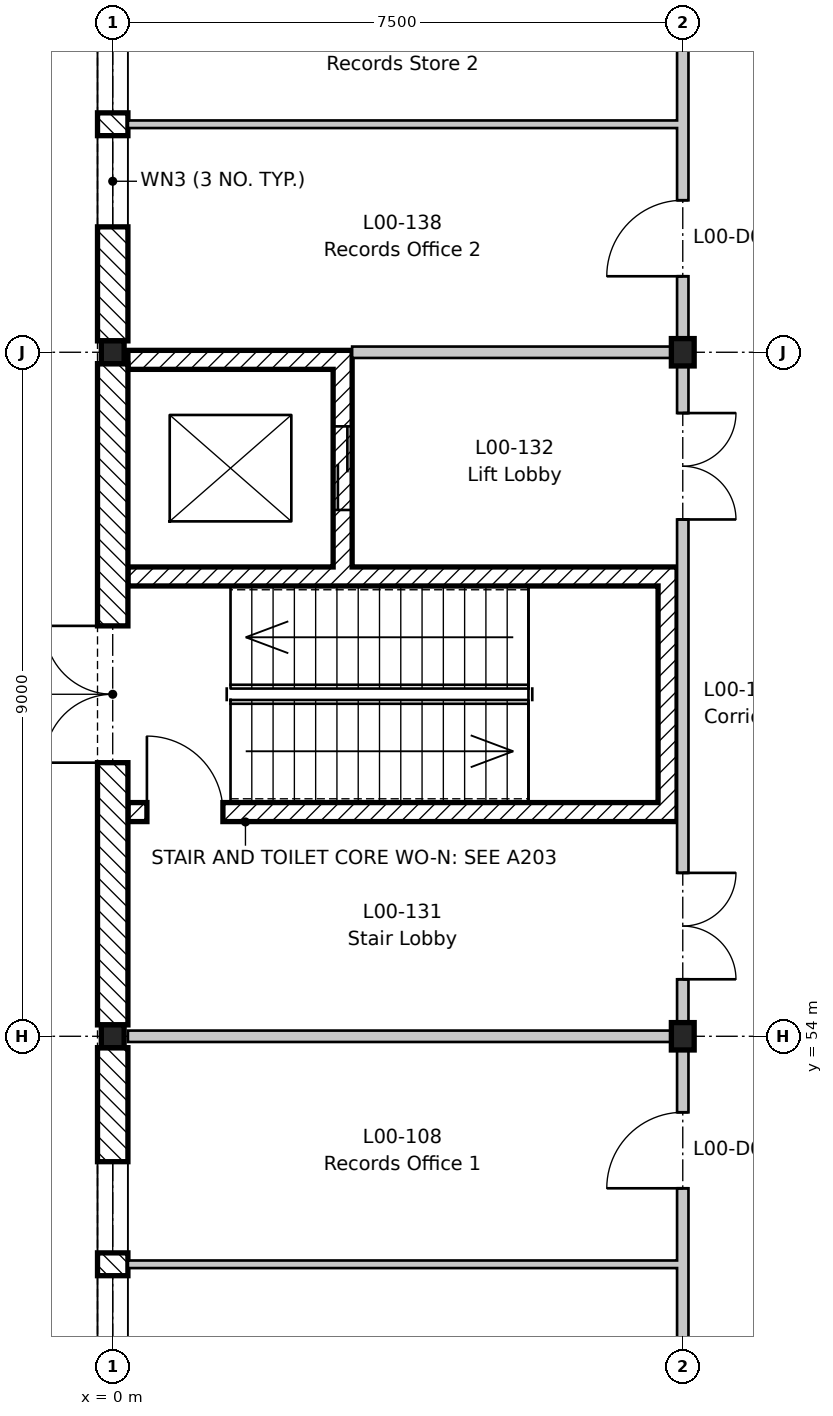
"""IFC4 building model, lengths in metres.
Left out: names, types, materials, properties, quantities, classifications, styles, units other than length and angle.
Written with IfcOpenShell. Run it as: python <this file> out.ifc"""

import sys

from ifc_helpers import new_model, si_unit, direction, frame, frame_2d, origin, origin_2d, place, context, subcontext, project, spatial, rectangle, i_section, extrude, element, fill, save


model = new_model("IFC4")
c1 = context("Model", 3, precision=1e-05, world=origin(), true_north=direction((0.0, 1.0)))
c2 = subcontext(c1, "Body", "Model", "MODEL_VIEW")
j1 = project(units=[si_unit("LENGTHUNIT", "METRE"), si_unit("PLANEANGLEUNIT", "RADIAN")], contexts=[c1])
p1 = place(None, origin())
s1 = spatial("IfcSite", under=j1, at=p1, CompositionType="ELEMENT")
p2 = place(p1, origin())
s2 = spatial("IfcBuilding", under=s1, at=p2, CompositionType="ELEMENT")
p3 = place(p2, origin())
s3 = spatial("IfcBuildingStorey", under=s2, at=p3, CompositionType="ELEMENT", Elevation=0.0)
for number, where, z_axis, x_axis in (
    (1, (0.0, 54.0, -0.6), (0.0, 0.0, 1.0), (1.0, 0.0, 0.0)),
    (2, (0.0, 63.0, -0.6), (0.0, 0.0, 1.0), (1.0, 0.0, 0.0)),
):
    element("IfcColumn", number, at=place(p3, frame(where, z_axis=z_axis, x_axis=x_axis)), inside=s3, PredefinedType="COLUMN", context=c2, shape_type="SweptSolid", body=[
        extrude(i_section(OverallWidth=0.3, OverallDepth=0.3, WebThickness=0.011, FlangeThickness=0.019, FilletRadius=0.027, at=origin_2d()), origin(), (0.0, 0.0, 1.0), 5.8),
    ])
for number, where, z_axis, x_axis in (
    (3, (7.5, 54.0, -0.6), (0.0, 0.0, 1.0), (1.0, 0.0, 0.0)),
    (4, (7.5, 63.0, -0.6), (0.0, 0.0, 1.0), (1.0, 0.0, 0.0)),
):
    element("IfcColumn", number, at=place(p3, frame(where, z_axis=z_axis, x_axis=x_axis)), inside=s3, PredefinedType="COLUMN", context=c2, shape_type="SweptSolid", body=[
        extrude(i_section(OverallWidth=0.3, OverallDepth=0.36, WebThickness=0.012, FlangeThickness=0.022, FilletRadius=0.027, at=origin_2d()), origin(), (0.0, 0.0, 1.0), 5.8),
    ])
p4 = place(p3, frame((0.2, 56.95, 0.0), z_axis=(0.0, 0.0, 1.0), x_axis=(1.0, 0.0, 0.0)))
e5 = element("IfcWall", 5, at=p4, inside=s3, PredefinedType="SHEAR", context=c2, shape_type="SweptSolid", body=[
    extrude(rectangle(XDim=7.225, YDim=0.25, at=frame_2d((3.613, 0.0))), origin(), (0.0, 0.0, 1.0), 5.2),
])
p5 = place(p4, frame((0.25, 0.0, 0.0)))
e6 = element("IfcOpeningElement", 6, at=p5, cuts=e5, PredefinedType="OPENING", context=c2, shape_type="SweptSolid", body=[
    extrude(rectangle(XDim=1.0, YDim=2.1, at=frame_2d((0.5, 1.05))), frame((0.0, 0.135, 0.0), z_axis=(0.0, -1.0, 0.0), x_axis=(1.0, 0.0, 0.0)), (0.0, 0.0, 1.0), 0.27),
])
p6 = place(p3, frame((0.2, 60.05, 0.0), z_axis=(0.0, 0.0, 1.0), x_axis=(1.0, 0.0, 0.0)))
e7 = element("IfcWall", 7, at=p6, inside=s3, PredefinedType="SHEAR", context=c2, shape_type="SweptSolid", body=[
    extrude(rectangle(XDim=7.225, YDim=0.25, at=frame_2d((3.613, 0.0))), origin(), (0.0, 0.0, 1.0), 5.2),
])
p7 = place(p3, frame((7.3, 57.075, 0.0), z_axis=(0.0, 0.0, 1.0), x_axis=(0.0, 1.0, 0.0)))
e8 = element("IfcWall", 8, at=p7, inside=s3, PredefinedType="SHEAR", context=c2, shape_type="SweptSolid", body=[
    extrude(rectangle(XDim=2.85, YDim=0.25, at=frame_2d((1.425, 0.0))), origin(), (0.0, 0.0, 1.0), 5.2),
])
p8 = place(p3, frame((3.025, 60.175, 0.0), z_axis=(0.0, 0.0, 1.0), x_axis=(0.0, 1.0, 0.0)))
e9 = element("IfcWall", 9, at=p8, inside=s3, PredefinedType="SHEAR", context=c2, shape_type="SweptSolid", body=[
    extrude(rectangle(XDim=2.6, YDim=0.25, at=frame_2d((1.3, 0.0))), origin(), (0.0, 0.0, 1.0), 5.2),
])
p9 = place(p8, frame((0.75, 0.0, 0.0)))
e10 = element("IfcOpeningElement", 10, at=p9, cuts=e9, PredefinedType="OPENING", context=c2, shape_type="SweptSolid", body=[
    extrude(rectangle(XDim=1.1, YDim=2.1, at=frame_2d((0.55, 1.05))), frame((0.0, 0.135, 0.0), z_axis=(0.0, -1.0, 0.0), x_axis=(1.0, 0.0, 0.0)), (0.0, 0.0, 1.0), 0.27),
])
p10 = place(p3, frame((0.2, 62.9, 0.0), z_axis=(0.0, 0.0, 1.0), x_axis=(1.0, 0.0, 0.0)))
e11 = element("IfcWall", 11, at=p10, inside=s3, PredefinedType="SHEAR", context=c2, shape_type="SweptSolid", body=[
    extrude(rectangle(XDim=2.95, YDim=0.25, at=frame_2d((1.475, 0.0))), origin(), (0.0, 0.0, 1.0), 5.2),
])
p11 = place(p3, frame((0.2, 60.05, -1.5), z_axis=(0.0, 0.0, 1.0), x_axis=(1.0, 0.0, 0.0)))
e12 = element("IfcWall", 12, at=p11, inside=s3, PredefinedType="SHEAR", context=c2, shape_type="SweptSolid", body=[
    extrude(rectangle(XDim=2.95, YDim=0.25, at=frame_2d((1.475, 0.0))), origin(), (0.0, 0.0, 1.0), 1.5),
])
p12 = place(p3, frame((3.025, 60.175, -1.5), z_axis=(0.0, 0.0, 1.0), x_axis=(0.0, 1.0, 0.0)))
e13 = element("IfcWall", 13, at=p12, inside=s3, PredefinedType="SHEAR", context=c2, shape_type="SweptSolid", body=[
    extrude(rectangle(XDim=2.6, YDim=0.25, at=frame_2d((1.3, 0.0))), origin(), (0.0, 0.0, 1.0), 1.5),
])
p13 = place(p3, frame((0.2, 62.9, -1.5), z_axis=(0.0, 0.0, 1.0), x_axis=(1.0, 0.0, 0.0)))
e14 = element("IfcWall", 14, at=p13, inside=s3, PredefinedType="SHEAR", context=c2, shape_type="SweptSolid", body=[
    extrude(rectangle(XDim=2.95, YDim=0.25, at=frame_2d((1.475, 0.0))), origin(), (0.0, 0.0, 1.0), 1.5),
])
p14 = place(p3, frame((0.0, 45.15, 0.0), z_axis=(0.0, 0.0, 1.0), x_axis=(0.0, 1.0, 0.0)))
e15 = element("IfcWall", 15, at=p14, inside=s3, PredefinedType="STANDARD", context=c2, shape_type="SweptSolid", body=[
    extrude(rectangle(XDim=8.7, YDim=0.4, at=frame_2d((4.35, 0.0))), origin(), (0.0, 0.0, 1.0), 4.8),
])
p15 = place(p14, frame((1.5, 0.0, 0.6)))
e16 = element("IfcOpeningElement", 16, at=p15, cuts=e15, PredefinedType="OPENING", context=c2, shape_type="SweptSolid", body=[
    extrude(rectangle(XDim=1.2, YDim=3.9, at=frame_2d((0.6, 1.95))), frame((0.0, 0.21, 0.0), z_axis=(0.0, -1.0, 0.0), x_axis=(1.0, 0.0, 0.0)), (0.0, 0.0, 1.0), 0.42),
])
p16 = place(p14, frame((3.0, 0.0, 0.6)))
e17 = element("IfcOpeningElement", 17, at=p16, cuts=e15, PredefinedType="OPENING", context=c2, shape_type="SweptSolid", body=[
    extrude(rectangle(XDim=1.2, YDim=3.9, at=frame_2d((0.6, 1.95))), frame((0.0, 0.21, 0.0), z_axis=(0.0, -1.0, 0.0), x_axis=(1.0, 0.0, 0.0)), (0.0, 0.0, 1.0), 0.42),
])
p17 = place(p14, frame((4.5, 0.0, 0.6)))
e18 = element("IfcOpeningElement", 18, at=p17, cuts=e15, PredefinedType="OPENING", context=c2, shape_type="SweptSolid", body=[
    extrude(rectangle(XDim=1.2, YDim=3.9, at=frame_2d((0.6, 1.95))), frame((0.0, 0.21, 0.0), z_axis=(0.0, -1.0, 0.0), x_axis=(1.0, 0.0, 0.0)), (0.0, 0.0, 1.0), 0.42),
])
p18 = place(p14, frame((6.0, 0.0, 0.6)))
e19 = element("IfcOpeningElement", 19, at=p18, cuts=e15, PredefinedType="OPENING", context=c2, shape_type="SweptSolid", body=[
    extrude(rectangle(XDim=1.2, YDim=3.9, at=frame_2d((0.6, 1.95))), frame((0.0, 0.21, 0.0), z_axis=(0.0, -1.0, 0.0), x_axis=(1.0, 0.0, 0.0)), (0.0, 0.0, 1.0), 0.42),
])
p19 = place(p3, frame((0.0, 54.15, 0.0), z_axis=(0.0, 0.0, 1.0), x_axis=(0.0, 1.0, 0.0)))
e20 = element("IfcWall", 20, at=p19, inside=s3, PredefinedType="STANDARD", context=c2, shape_type="SweptSolid", body=[
    extrude(rectangle(XDim=8.7, YDim=0.4, at=frame_2d((4.35, 0.0))), origin(), (0.0, 0.0, 1.0), 4.8),
])
p20 = place(p19, frame((3.45, 0.0, 0.0)))
e21 = element("IfcOpeningElement", 21, at=p20, cuts=e20, PredefinedType="OPENING", context=c2, shape_type="SweptSolid", body=[
    extrude(rectangle(XDim=1.8, YDim=2.1, at=frame_2d((0.9, 1.05))), frame((0.0, 0.21, 0.0), z_axis=(0.0, -1.0, 0.0), x_axis=(1.0, 0.0, 0.0)), (0.0, 0.0, 1.0), 0.42),
])
p21 = place(p3, frame((0.0, 63.15, 0.0), z_axis=(0.0, 0.0, 1.0), x_axis=(0.0, 1.0, 0.0)))
e22 = element("IfcWall", 22, at=p21, inside=s3, PredefinedType="STANDARD", context=c2, shape_type="SweptSolid", body=[
    extrude(rectangle(XDim=7.2, YDim=0.4, at=frame_2d((3.6, 0.0))), origin(), (0.0, 0.0, 1.0), 4.8),
])
p22 = place(p21, frame((1.5, 0.0, 0.6)))
e23 = element("IfcOpeningElement", 23, at=p22, cuts=e22, PredefinedType="OPENING", context=c2, shape_type="SweptSolid", body=[
    extrude(rectangle(XDim=1.2, YDim=3.9, at=frame_2d((0.6, 1.95))), frame((0.0, 0.21, 0.0), z_axis=(0.0, -1.0, 0.0), x_axis=(1.0, 0.0, 0.0)), (0.0, 0.0, 1.0), 0.42),
])
p23 = place(p21, frame((3.0, 0.0, 0.6)))
e24 = element("IfcOpeningElement", 24, at=p23, cuts=e22, PredefinedType="OPENING", context=c2, shape_type="SweptSolid", body=[
    extrude(rectangle(XDim=1.2, YDim=3.9, at=frame_2d((0.6, 1.95))), frame((0.0, 0.21, 0.0), z_axis=(0.0, -1.0, 0.0), x_axis=(1.0, 0.0, 0.0)), (0.0, 0.0, 1.0), 0.42),
])
p24 = place(p21, frame((4.5, 0.0, 0.6)))
e25 = element("IfcOpeningElement", 25, at=p24, cuts=e22, PredefinedType="OPENING", context=c2, shape_type="SweptSolid", body=[
    extrude(rectangle(XDim=1.2, YDim=3.9, at=frame_2d((0.6, 1.95))), frame((0.0, 0.21, 0.0), z_axis=(0.0, -1.0, 0.0), x_axis=(1.0, 0.0, 0.0)), (0.0, 0.0, 1.0), 0.42),
])
p25 = place(p3, frame((0.2, 51.0, 0.0), z_axis=(0.0, 0.0, 1.0), x_axis=(1.0, 0.0, 0.0)))
e26 = element("IfcWall", 26, at=p25, inside=s3, PredefinedType="PARTITIONING", context=c2, shape_type="SweptSolid", body=[
    extrude(rectangle(XDim=7.225, YDim=0.1, at=frame_2d((3.613, 0.0))), origin(), (0.0, 0.0, 1.0), 5.2),
])
p26 = place(p3, frame((0.2, 54.0, 0.0), z_axis=(0.0, 0.0, 1.0), x_axis=(1.0, 0.0, 0.0)))
e27 = element("IfcWall", 27, at=p26, inside=s3, PredefinedType="PARTITIONING", context=c2, shape_type="SweptSolid", body=[
    extrude(rectangle(XDim=7.225, YDim=0.15, at=frame_2d((3.613, 0.0))), origin(), (0.0, 0.0, 1.0), 4.85),
])
p27 = place(p3, frame((7.5, -8.8, 0.0), z_axis=(0.0, 0.0, 1.0), x_axis=(0.0, 1.0, 0.0)))
e28 = element("IfcWall", 28, at=p27, inside=s3, PredefinedType="PARTITIONING", context=c2, shape_type="SweptSolid", body=[
    extrude(rectangle(XDim=79.3, YDim=0.15, at=frame_2d((39.65, 0.0))), origin(), (0.0, 0.0, 1.0), 4.68),
])
p28 = place(p27, frame((18.8, 0.0, 0.0)))
e29 = element("IfcOpeningElement", 29, at=p28, cuts=e28, PredefinedType="OPENING", context=c2, shape_type="SweptSolid", body=[
    extrude(rectangle(XDim=1.0, YDim=2.1, at=frame_2d((0.5, 1.05))), frame((0.0, 0.085, 0.0), z_axis=(0.0, -1.0, 0.0), x_axis=(1.0, 0.0, 0.0)), (0.0, 0.0, 1.0), 0.17),
])
p29 = place(p27, frame((23.3, 0.0, 0.0)))
e30 = element("IfcOpeningElement", 30, at=p29, cuts=e28, PredefinedType="OPENING", context=c2, shape_type="SweptSolid", body=[
    extrude(rectangle(XDim=1.0, YDim=2.1, at=frame_2d((0.5, 1.05))), frame((0.0, 0.085, 0.0), z_axis=(0.0, -1.0, 0.0), x_axis=(1.0, 0.0, 0.0)), (0.0, 0.0, 1.0), 0.17),
])
p30 = place(p27, frame((27.8, 0.0, 0.0)))
e31 = element("IfcOpeningElement", 31, at=p30, cuts=e28, PredefinedType="OPENING", context=c2, shape_type="SweptSolid", body=[
    extrude(rectangle(XDim=1.0, YDim=2.1, at=frame_2d((0.5, 1.05))), frame((0.0, 0.085, 0.0), z_axis=(0.0, -1.0, 0.0), x_axis=(1.0, 0.0, 0.0)), (0.0, 0.0, 1.0), 0.17),
])
p31 = place(p27, frame((30.8, 0.0, 0.0)))
e32 = element("IfcOpeningElement", 32, at=p31, cuts=e28, PredefinedType="OPENING", context=c2, shape_type="SweptSolid", body=[
    extrude(rectangle(XDim=1.0, YDim=2.1, at=frame_2d((0.5, 1.05))), frame((0.0, 0.085, 0.0), z_axis=(0.0, -1.0, 0.0), x_axis=(1.0, 0.0, 0.0)), (0.0, 0.0, 1.0), 0.17),
])
p32 = place(p27, frame((33.8, 0.0, 0.0)))
e33 = element("IfcOpeningElement", 33, at=p32, cuts=e28, PredefinedType="OPENING", context=c2, shape_type="SweptSolid", body=[
    extrude(rectangle(XDim=1.0, YDim=2.1, at=frame_2d((0.5, 1.05))), frame((0.0, 0.085, 0.0), z_axis=(0.0, -1.0, 0.0), x_axis=(1.0, 0.0, 0.0)), (0.0, 0.0, 1.0), 0.17),
])
p33 = place(p27, frame((48.6, 0.0, 0.0)))
e34 = element("IfcOpeningElement", 34, at=p33, cuts=e28, PredefinedType="OPENING", context=c2, shape_type="SweptSolid", body=[
    extrude(rectangle(XDim=1.4, YDim=2.1, at=frame_2d((0.7, 1.05))), frame((0.0, 0.085, 0.0), z_axis=(0.0, -1.0, 0.0), x_axis=(1.0, 0.0, 0.0)), (0.0, 0.0, 1.0), 0.17),
])
p34 = place(p27, frame((56.3, 0.0, 0.0)))
e35 = element("IfcOpeningElement", 35, at=p34, cuts=e28, PredefinedType="OPENING", context=c2, shape_type="SweptSolid", body=[
    extrude(rectangle(XDim=1.0, YDim=2.1, at=frame_2d((0.5, 1.05))), frame((0.0, 0.085, 0.0), z_axis=(0.0, -1.0, 0.0), x_axis=(1.0, 0.0, 0.0)), (0.0, 0.0, 1.0), 0.17),
])
p35 = place(p27, frame((60.8, 0.0, 0.0)))
e36 = element("IfcOpeningElement", 36, at=p35, cuts=e28, PredefinedType="OPENING", context=c2, shape_type="SweptSolid", body=[
    extrude(rectangle(XDim=1.0, YDim=2.1, at=frame_2d((0.5, 1.05))), frame((0.0, 0.085, 0.0), z_axis=(0.0, -1.0, 0.0), x_axis=(1.0, 0.0, 0.0)), (0.0, 0.0, 1.0), 0.17),
])
p36 = place(p27, frame((12.6, 0.0, 0.0)))
e37 = element("IfcOpeningElement", 37, at=p36, cuts=e28, PredefinedType="OPENING", context=c2, shape_type="SweptSolid", body=[
    extrude(rectangle(XDim=1.4, YDim=2.1, at=frame_2d((0.7, 1.05))), frame((0.0, 0.085, 0.0), z_axis=(0.0, -1.0, 0.0), x_axis=(1.0, 0.0, 0.0)), (0.0, 0.0, 1.0), 0.17),
])
p37 = place(p27, frame((3.6, 0.0, 0.0)))
e38 = element("IfcOpeningElement", 38, at=p37, cuts=e28, PredefinedType="OPENING", context=c2, shape_type="SweptSolid", body=[
    extrude(rectangle(XDim=1.4, YDim=2.1, at=frame_2d((0.7, 1.05))), frame((0.0, 0.085, 0.0), z_axis=(0.0, -1.0, 0.0), x_axis=(1.0, 0.0, 0.0)), (0.0, 0.0, 1.0), 0.17),
])
p38 = place(p27, frame((63.55, 0.0, 0.0)))
e39 = element("IfcOpeningElement", 39, at=p38, cuts=e28, PredefinedType="OPENING", context=c2, shape_type="SweptSolid", body=[
    extrude(rectangle(XDim=1.4, YDim=2.1, at=frame_2d((0.7, 1.05))), frame((0.0, 0.085, 0.0), z_axis=(0.0, -1.0, 0.0), x_axis=(1.0, 0.0, 0.0)), (0.0, 0.0, 1.0), 0.17),
])
p39 = place(p27, frame((69.6, 0.0, 0.0)))
e40 = element("IfcOpeningElement", 40, at=p39, cuts=e28, PredefinedType="OPENING", context=c2, shape_type="SweptSolid", body=[
    extrude(rectangle(XDim=1.4, YDim=2.1, at=frame_2d((0.7, 1.05))), frame((0.0, 0.085, 0.0), z_axis=(0.0, -1.0, 0.0), x_axis=(1.0, 0.0, 0.0)), (0.0, 0.0, 1.0), 0.17),
])
p40 = place(p27, frame((42.85, 0.0, 0.0)))
e41 = element("IfcOpeningElement", 41, at=p40, cuts=e28, PredefinedType="OPENING", context=c2, shape_type="SweptSolid", body=[
    extrude(rectangle(XDim=1.0, YDim=2.1, at=frame_2d((0.5, 1.05))), frame((0.0, 0.085, 0.0), z_axis=(0.0, -1.0, 0.0), x_axis=(1.0, 0.0, 0.0)), (0.0, 0.0, 1.0), 0.17),
])
p41 = place(p27, frame((36.55, 0.0, 0.0)))
e42 = element("IfcOpeningElement", 42, at=p41, cuts=e28, PredefinedType="OPENING", context=c2, shape_type="SweptSolid", body=[
    extrude(rectangle(XDim=1.4, YDim=2.1, at=frame_2d((0.7, 1.05))), frame((0.0, 0.085, 0.0), z_axis=(0.0, -1.0, 0.0), x_axis=(1.0, 0.0, 0.0)), (0.0, 0.0, 1.0), 0.17),
])
p42 = place(p27, frame((72.8, 0.0, 0.0)))
e43 = element("IfcOpeningElement", 43, at=p42, cuts=e28, PredefinedType="OPENING", context=c2, shape_type="SweptSolid", body=[
    extrude(rectangle(XDim=1.0, YDim=2.1, at=frame_2d((0.5, 1.05))), frame((0.0, 0.085, 0.0), z_axis=(0.0, -1.0, 0.0), x_axis=(1.0, 0.0, 0.0)), (0.0, 0.0, 1.0), 0.17),
])
p43 = place(p3, frame((3.15, 63.0, 0.0), z_axis=(0.0, 0.0, 1.0), x_axis=(1.0, 0.0, 0.0)))
e44 = element("IfcWall", 44, at=p43, inside=s3, PredefinedType="PARTITIONING", context=c2, shape_type="SweptSolid", body=[
    extrude(rectangle(XDim=4.275, YDim=0.15, at=frame_2d((2.138, 0.0))), origin(), (0.0, 0.0, 1.0), 4.85),
])
p44 = place(p3, frame((0.2, 66.0, 0.0), z_axis=(0.0, 0.0, 1.0), x_axis=(1.0, 0.0, 0.0)))
e45 = element("IfcWall", 45, at=p44, inside=s3, PredefinedType="PARTITIONING", context=c2, shape_type="SweptSolid", body=[
    extrude(rectangle(XDim=7.225, YDim=0.1, at=frame_2d((3.613, 0.0))), origin(), (0.0, 0.0, 1.0), 5.2),
])
p45 = place(p17, origin())
e46 = element("IfcWindow", 46, at=p45, inside=s3, PartitioningType="SINGLE_PANEL", PredefinedType="WINDOW", context=c2, shape_type="SweptSolid", body=[
    extrude(rectangle(XDim=1.2, YDim=3.9, at=frame_2d((0.6, 1.95))), frame((0.0, 0.03, 0.0), z_axis=(0.0, -1.0, 0.0), x_axis=(1.0, 0.0, 0.0)), (0.0, 0.0, 1.0), 0.06),
])
fill(e18, e46)
p46 = place(p18, origin())
e47 = element("IfcWindow", 47, at=p46, inside=s3, PartitioningType="SINGLE_PANEL", PredefinedType="WINDOW", context=c2, shape_type="SweptSolid", body=[
    extrude(rectangle(XDim=1.2, YDim=3.9, at=frame_2d((0.6, 1.95))), frame((0.0, 0.03, 0.0), z_axis=(0.0, -1.0, 0.0), x_axis=(1.0, 0.0, 0.0)), (0.0, 0.0, 1.0), 0.06),
])
fill(e19, e47)
p47 = place(p20, origin())
e48 = element("IfcDoor", 48, at=p47, inside=s3, OperationType="DOUBLE_DOOR_SINGLE_SWING", PredefinedType="DOOR", context=c2, shape_type="SweptSolid", body=[
    extrude(rectangle(XDim=1.8, YDim=2.1, at=frame_2d((0.9, 1.05))), frame((0.0, 0.025, 0.0), z_axis=(0.0, -1.0, 0.0), x_axis=(1.0, 0.0, 0.0)), (0.0, 0.0, 1.0), 0.05),
])
fill(e21, e48)
p48 = place(p22, origin())
e49 = element("IfcWindow", 49, at=p48, inside=s3, PartitioningType="SINGLE_PANEL", PredefinedType="WINDOW", context=c2, shape_type="SweptSolid", body=[
    extrude(rectangle(XDim=1.2, YDim=3.9, at=frame_2d((0.6, 1.95))), frame((0.0, 0.03, 0.0), z_axis=(0.0, -1.0, 0.0), x_axis=(1.0, 0.0, 0.0)), (0.0, 0.0, 1.0), 0.06),
])
fill(e23, e49)
p49 = place(p23, origin())
e50 = element("IfcWindow", 50, at=p49, inside=s3, PartitioningType="SINGLE_PANEL", PredefinedType="WINDOW", context=c2, shape_type="SweptSolid", body=[
    extrude(rectangle(XDim=1.2, YDim=3.9, at=frame_2d((0.6, 1.95))), frame((0.0, 0.03, 0.0), z_axis=(0.0, -1.0, 0.0), x_axis=(1.0, 0.0, 0.0)), (0.0, 0.0, 1.0), 0.06),
])
fill(e24, e50)
p50 = place(p35, origin())
e51 = element("IfcDoor", 51, at=p50, inside=s3, OperationType="SINGLE_SWING_LEFT", PredefinedType="DOOR", context=c2, shape_type="SweptSolid", body=[
    extrude(rectangle(XDim=1.0, YDim=2.1, at=frame_2d((0.5, 1.05))), frame((0.0, 0.025, 0.0), z_axis=(0.0, -1.0, 0.0), x_axis=(1.0, 0.0, 0.0)), (0.0, 0.0, 1.0), 0.05),
])
fill(e36, e51)
p51 = place(p5, origin())
e52 = element("IfcDoor", 52, at=p51, inside=s3, OperationType="SINGLE_SWING_LEFT", PredefinedType="DOOR", context=c2, shape_type="SweptSolid", body=[
    extrude(rectangle(XDim=1.0, YDim=2.1, at=frame_2d((0.5, 1.05))), frame((0.0, 0.025, 0.0), z_axis=(0.0, -1.0, 0.0), x_axis=(1.0, 0.0, 0.0)), (0.0, 0.0, 1.0), 0.05),
])
fill(e6, e52)
p52 = place(p38, frame((1.4, 0.0, 0.0), z_axis=(0.0, 0.0, 1.0), x_axis=(-1.0, 0.0, 0.0)))
e53 = element("IfcDoor", 53, at=p52, inside=s3, OperationType="DOUBLE_DOOR_SINGLE_SWING", PredefinedType="DOOR", context=c2, shape_type="SweptSolid", body=[
    extrude(rectangle(XDim=1.4, YDim=2.1, at=frame_2d((0.7, 1.05))), frame((0.0, 0.025, 0.0), z_axis=(0.0, -1.0, 0.0), x_axis=(1.0, 0.0, 0.0)), (0.0, 0.0, 1.0), 0.05),
])
fill(e39, e53)
p53 = place(p39, frame((1.4, 0.0, 0.0), z_axis=(0.0, 0.0, 1.0), x_axis=(-1.0, 0.0, 0.0)))
e54 = element("IfcDoor", 54, at=p53, inside=s3, OperationType="DOUBLE_DOOR_SINGLE_SWING", PredefinedType="DOOR", context=c2, shape_type="SweptSolid", body=[
    extrude(rectangle(XDim=1.4, YDim=2.1, at=frame_2d((0.7, 1.05))), frame((0.0, 0.025, 0.0), z_axis=(0.0, -1.0, 0.0), x_axis=(1.0, 0.0, 0.0)), (0.0, 0.0, 1.0), 0.05),
])
fill(e40, e54)
p54 = place(p42, origin())
e55 = element("IfcDoor", 55, at=p54, inside=s3, OperationType="SINGLE_SWING_LEFT", PredefinedType="DOOR", context=c2, shape_type="SweptSolid", body=[
    extrude(rectangle(XDim=1.0, YDim=2.1, at=frame_2d((0.5, 1.05))), frame((0.0, 0.025, 0.0), z_axis=(0.0, -1.0, 0.0), x_axis=(1.0, 0.0, 0.0)), (0.0, 0.0, 1.0), 0.05),
])
fill(e43, e55)
p55 = place(p9, origin())
e56 = element("IfcDoor", 56, at=p55, inside=s3, OperationType="SLIDING_TO_LEFT", PredefinedType="DOOR", context=c2, shape_type="SweptSolid", body=[
    extrude(rectangle(XDim=1.1, YDim=2.1, at=frame_2d((0.55, 1.05))), frame((0.0, 0.025, 0.0), z_axis=(0.0, -1.0, 0.0), x_axis=(1.0, 0.0, 0.0)), (0.0, 0.0, 1.0), 0.05),
])
fill(e10, e56)
save(model, sys.argv[1])
